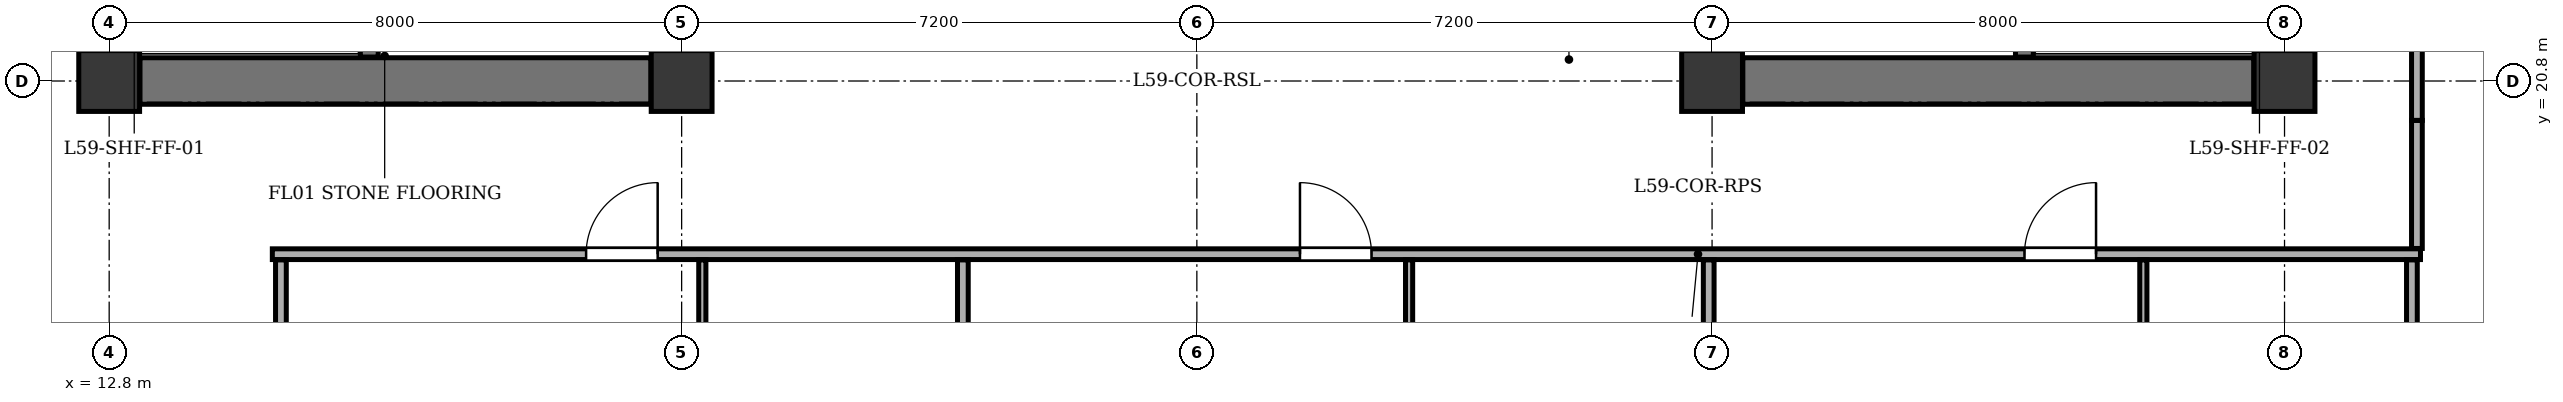
"""IFC4 building model, lengths in metres.
Left out: names, types, materials, properties, quantities, classifications, styles, units other than length and angle.
Written with IfcOpenShell. Run it as: python <this file> out.ifc"""

import sys

from ifc_helpers import new_model, si_unit, direction, frame, frame_2d, origin, origin_2d, place, context, subcontext, project, spatial, rectangle, extrude, element, fill, save


model = new_model("IFC4")
c1 = context("Model", 3, precision=1e-05, world=origin(), true_north=direction((0.0, 1.0)))
c2 = subcontext(c1, "Body", "Model", "MODEL_VIEW")
j1 = project(units=[si_unit("LENGTHUNIT", "METRE"), si_unit("PLANEANGLEUNIT", "RADIAN")], contexts=[c1])
p1 = place(None, origin())
s1 = spatial("IfcSite", under=j1, at=p1, CompositionType="ELEMENT")
p2 = place(p1, origin())
s2 = spatial("IfcBuilding", under=s1, at=p2, CompositionType="ELEMENT")
p3 = place(p2, frame((0.0, 0.0, 227.9)))
s3 = spatial("IfcBuildingStorey", under=s2, at=p3, CompositionType="ELEMENT", Elevation=227.9)
for number, where, z_axis, x_axis in (
    (1, (12.8, 20.8, 0.0), (0.0, 0.0, 1.0), (1.0, 0.0, 0.0)),
    (2, (20.8, 20.8, 0.0), (0.0, 0.0, 1.0), (1.0, 0.0, 0.0)),
    (3, (35.2, 20.8, 0.0), (0.0, 0.0, 1.0), (1.0, 0.0, 0.0)),
    (4, (43.2, 20.8, 0.0), (0.0, 0.0, 1.0), (1.0, 0.0, 0.0)),
):
    element("IfcColumn", number, at=place(p3, frame(where, z_axis=z_axis, x_axis=x_axis)), inside=s3, PredefinedType="COLUMN", context=c2, shape_type="SweptSolid", body=[
        extrude(rectangle(XDim=0.85, YDim=0.85, at=origin_2d()), origin(), (0.0, 0.0, 1.0), 3.4),
    ])
p4 = place(p3, frame((13.23, 20.8, 0.0), z_axis=(0.0, 0.0, 1.0), x_axis=(1.0, 0.0, 0.0)))
e5 = element("IfcWall", 5, at=p4, inside=s3, PredefinedType="SHEAR", context=c2, shape_type="SweptSolid", body=[
    extrude(rectangle(XDim=7.14, YDim=0.65, at=frame_2d((3.57, 0.0))), origin(), (0.0, 0.0, 1.0), 3.1),
])
p5 = place(p3, frame((16.435, 21.135, 0.0), z_axis=(0.0, 0.0, 1.0), x_axis=(0.0, 1.0, 0.0)))
e6 = element("IfcWall", 6, at=p5, inside=s3, PredefinedType="SHEAR", context=c2, shape_type="SweptSolid", body=[
    extrude(rectangle(XDim=12.13, YDim=0.25, at=frame_2d((6.065, 0.0))), origin(), (0.0, 0.0, 1.0), 3.1),
])
p6 = place(p5, frame((0.515, 0.0, 0.0)))
e7 = element("IfcOpeningElement", 7, at=p6, cuts=e6, PredefinedType="OPENING", context=c2, shape_type="SweptSolid", body=[
    extrude(rectangle(XDim=1.2, YDim=2.15, at=frame_2d((0.6, 1.075))), frame((0.0, 0.135, 0.0), z_axis=(0.0, -1.0, 0.0), x_axis=(1.0, 0.0, 0.0)), (0.0, 0.0, 1.0), 0.27),
])
p7 = place(p5, frame((2.665, 0.0, 0.0)))
e8 = element("IfcOpeningElement", 8, at=p7, cuts=e6, PredefinedType="OPENING", context=c2, shape_type="SweptSolid", body=[
    extrude(rectangle(XDim=1.15, YDim=2.15, at=frame_2d((0.575, 1.075))), frame((0.0, 0.135, 0.0), z_axis=(0.0, -1.0, 0.0), x_axis=(1.0, 0.0, 0.0)), (0.0, 0.0, 1.0), 0.27),
])
p8 = place(p3, frame((35.63, 20.8, 0.0), z_axis=(0.0, 0.0, 1.0), x_axis=(1.0, 0.0, 0.0)))
e9 = element("IfcWall", 9, at=p8, inside=s3, PredefinedType="SHEAR", context=c2, shape_type="SweptSolid", body=[
    extrude(rectangle(XDim=7.14, YDim=0.65, at=frame_2d((3.57, 0.0))), origin(), (0.0, 0.0, 1.0), 3.1),
])
p9 = place(p3, frame((39.565, 21.135, 0.0), z_axis=(0.0, 0.0, 1.0), x_axis=(0.0, 1.0, 0.0)))
e10 = element("IfcWall", 10, at=p9, inside=s3, PredefinedType="SHEAR", context=c2, shape_type="SweptSolid", body=[
    extrude(rectangle(XDim=12.13, YDim=0.25, at=frame_2d((6.065, 0.0))), origin(), (0.0, 0.0, 1.0), 3.1),
])
p10 = place(p9, frame((0.515, 0.0, 0.0)))
e11 = element("IfcOpeningElement", 11, at=p10, cuts=e10, PredefinedType="OPENING", context=c2, shape_type="SweptSolid", body=[
    extrude(rectangle(XDim=1.2, YDim=2.15, at=frame_2d((0.6, 1.075))), frame((0.0, 0.135, 0.0), z_axis=(0.0, -1.0, 0.0), x_axis=(1.0, 0.0, 0.0)), (0.0, 0.0, 1.0), 0.27),
])
p11 = place(p9, frame((2.665, 0.0, 0.0)))
e12 = element("IfcOpeningElement", 12, at=p11, cuts=e10, PredefinedType="OPENING", context=c2, shape_type="SweptSolid", body=[
    extrude(rectangle(XDim=1.15, YDim=2.15, at=frame_2d((0.575, 1.075))), frame((0.0, 0.135, 0.0), z_axis=(0.0, -1.0, 0.0), x_axis=(1.0, 0.0, 0.0)), (0.0, 0.0, 1.0), 0.27),
])
p12 = place(p3, frame((15.08, 18.38, 0.0), z_axis=(0.0, 0.0, 1.0), x_axis=(1.0, 0.0, 0.0)))
e13 = element("IfcWall", 13, at=p12, inside=s3, PredefinedType="PARTITIONING", context=c2, shape_type="SweptSolid", body=[
    extrude(rectangle(XDim=30.02, YDim=0.15, at=frame_2d((15.01, 0.0))), origin(), (0.0, 0.0, 1.0), 3.1),
])
p13 = place(p12, frame((4.385, 0.0, 0.0)))
e14 = element("IfcOpeningElement", 14, at=p13, cuts=e13, PredefinedType="OPENING", context=c2, shape_type="SweptSolid", body=[
    extrude(rectangle(XDim=1.0, YDim=2.1, at=frame_2d((0.5, 1.05))), frame((0.0, 0.085, 0.0), z_axis=(0.0, -1.0, 0.0), x_axis=(1.0, 0.0, 0.0)), (0.0, 0.0, 1.0), 0.17),
])
p14 = place(p12, frame((14.361, 0.0, 0.0)))
e15 = element("IfcOpeningElement", 15, at=p14, cuts=e13, PredefinedType="OPENING", context=c2, shape_type="SweptSolid", body=[
    extrude(rectangle(XDim=1.0, YDim=2.1, at=frame_2d((0.5, 1.05))), frame((0.0, 0.085, 0.0), z_axis=(0.0, -1.0, 0.0), x_axis=(1.0, 0.0, 0.0)), (0.0, 0.0, 1.0), 0.17),
])
p15 = place(p12, frame((24.486, 0.0, 0.0)))
e16 = element("IfcOpeningElement", 16, at=p15, cuts=e13, PredefinedType="OPENING", context=c2, shape_type="SweptSolid", body=[
    extrude(rectangle(XDim=1.0, YDim=2.1, at=frame_2d((0.5, 1.05))), frame((0.0, 0.085, 0.0), z_axis=(0.0, -1.0, 0.0), x_axis=(1.0, 0.0, 0.0)), (0.0, 0.0, 1.0), 0.17),
])
p16 = place(p3, frame((15.2, 3.045, 0.0), z_axis=(0.0, 0.0, 1.0), x_axis=(0.0, 1.0, 0.0)))
e17 = element("IfcWall", 17, at=p16, inside=s3, PredefinedType="PARTITIONING", context=c2, shape_type="SweptSolid", body=[
    extrude(rectangle(XDim=15.255, YDim=0.15, at=frame_2d((7.627, 0.0))), origin(), (0.0, 0.0, 1.0), 3.1),
])
p17 = place(p3, frame((21.089, 5.605, 0.0), z_axis=(0.0, 0.0, 1.0), x_axis=(0.0, 1.0, 0.0)))
e18 = element("IfcWall", 18, at=p17, inside=s3, PredefinedType="PARTITIONING", context=c2, shape_type="SweptSolid", body=[
    extrude(rectangle(XDim=12.695, YDim=0.1, at=frame_2d((6.348, 0.0))), origin(), (0.0, 0.0, 1.0), 2.535),
])
p18 = place(p17, frame((0.605, 0.0, 0.0)))
e19 = element("IfcOpeningElement", 19, at=p18, cuts=e18, PredefinedType="OPENING", context=c2, shape_type="SweptSolid", body=[
    extrude(rectangle(XDim=0.9, YDim=2.05, at=frame_2d((0.45, 1.025))), frame((0.0, 0.06, 0.0), z_axis=(0.0, -1.0, 0.0), x_axis=(1.0, 0.0, 0.0)), (0.0, 0.0, 1.0), 0.12),
])
p19 = place(p3, frame((24.73, 3.045, 0.0), z_axis=(0.0, 0.0, 1.0), x_axis=(0.0, 1.0, 0.0)))
e20 = element("IfcWall", 20, at=p19, inside=s3, PredefinedType="PARTITIONING", context=c2, shape_type="SweptSolid", body=[
    extrude(rectangle(XDim=15.255, YDim=0.15, at=frame_2d((7.627, 0.0))), origin(), (0.0, 0.0, 1.0), 3.1),
])
p20 = place(p3, frame((30.966, 5.605, 0.0), z_axis=(0.0, 0.0, 1.0), x_axis=(0.0, 1.0, 0.0)))
e21 = element("IfcWall", 21, at=p20, inside=s3, PredefinedType="PARTITIONING", context=c2, shape_type="SweptSolid", body=[
    extrude(rectangle(XDim=12.695, YDim=0.1, at=frame_2d((6.348, 0.0))), origin(), (0.0, 0.0, 1.0), 3.1),
])
p21 = place(p20, frame((0.605, 0.0, 0.0)))
e22 = element("IfcOpeningElement", 22, at=p21, cuts=e21, PredefinedType="OPENING", context=c2, shape_type="SweptSolid", body=[
    extrude(rectangle(XDim=0.9, YDim=2.05, at=frame_2d((0.45, 1.025))), frame((0.0, 0.06, 0.0), z_axis=(0.0, -1.0, 0.0), x_axis=(1.0, 0.0, 0.0)), (0.0, 0.0, 1.0), 0.12),
])
p22 = place(p3, frame((35.153, 3.045, 0.0), z_axis=(0.0, 0.0, 1.0), x_axis=(0.0, 1.0, 0.0)))
e23 = element("IfcWall", 23, at=p22, inside=s3, PredefinedType="PARTITIONING", context=c2, shape_type="SweptSolid", body=[
    extrude(rectangle(XDim=15.255, YDim=0.15, at=frame_2d((7.627, 0.0))), origin(), (0.0, 0.0, 1.0), 2.535),
])
p23 = place(p3, frame((41.227, 5.605, 0.0), z_axis=(0.0, 0.0, 1.0), x_axis=(0.0, 1.0, 0.0)))
e24 = element("IfcWall", 24, at=p23, inside=s3, PredefinedType="PARTITIONING", context=c2, shape_type="SweptSolid", body=[
    extrude(rectangle(XDim=12.695, YDim=0.1, at=frame_2d((6.348, 0.0))), origin(), (0.0, 0.0, 1.0), 3.1),
])
p24 = place(p23, frame((0.605, 0.0, 0.0)))
e25 = element("IfcOpeningElement", 25, at=p24, cuts=e24, PredefinedType="OPENING", context=c2, shape_type="SweptSolid", body=[
    extrude(rectangle(XDim=0.9, YDim=2.05, at=frame_2d((0.45, 1.025))), frame((0.0, 0.06, 0.0), z_axis=(0.0, -1.0, 0.0), x_axis=(1.0, 0.0, 0.0)), (0.0, 0.0, 1.0), 0.12),
])
p25 = place(p3, frame((44.98, 3.045, 0.0), z_axis=(0.0, 0.0, 1.0), x_axis=(0.0, 1.0, 0.0)))
e26 = element("IfcWall", 26, at=p25, inside=s3, PredefinedType="PARTITIONING", context=c2, shape_type="SweptSolid", body=[
    extrude(rectangle(XDim=15.255, YDim=0.15, at=frame_2d((7.627, 0.0))), origin(), (0.0, 0.0, 1.0), 2.725),
])
p26 = place(p3, frame((45.05, 18.46, 0.0), z_axis=(0.0, 0.0, 1.0), x_axis=(0.0, 1.0, 0.0)))
e27 = element("IfcWall", 27, at=p26, inside=s3, PredefinedType="PARTITIONING", context=c2, shape_type="SweptSolid", body=[
    extrude(rectangle(XDim=1.79, YDim=0.15, at=frame_2d((0.895, 0.0))), origin(), (0.0, 0.0, 1.0), 2.725),
])
p27 = place(p3, frame((45.05, 20.25, 0.0), z_axis=(0.0, 0.0, 1.0), x_axis=(0.0, 1.0, 0.0)))
e28 = element("IfcWall", 28, at=p27, inside=s3, PredefinedType="PARTITIONING", context=c2, shape_type="SweptSolid", body=[
    extrude(rectangle(XDim=13.9, YDim=0.15, at=frame_2d((6.95, 0.0))), origin(), (0.0, 0.0, 1.0), 2.725),
])
p28 = place(p13, origin())
e29 = element("IfcDoor", 29, at=p28, inside=s3, OperationType="SINGLE_SWING_RIGHT", PredefinedType="DOOR", context=c2, shape_type="SweptSolid", body=[
    extrude(rectangle(XDim=1.0, YDim=2.1, at=frame_2d((0.5, 1.05))), frame((0.0, 0.025, 0.0), z_axis=(0.0, -1.0, 0.0), x_axis=(1.0, 0.0, 0.0)), (0.0, 0.0, 1.0), 0.05),
])
fill(e14, e29)
p29 = place(p14, origin())
e30 = element("IfcDoor", 30, at=p29, inside=s3, OperationType="SINGLE_SWING_LEFT", PredefinedType="DOOR", context=c2, shape_type="SweptSolid", body=[
    extrude(rectangle(XDim=1.0, YDim=2.1, at=frame_2d((0.5, 1.05))), frame((0.0, 0.025, 0.0), z_axis=(0.0, -1.0, 0.0), x_axis=(1.0, 0.0, 0.0)), (0.0, 0.0, 1.0), 0.05),
])
fill(e15, e30)
p30 = place(p15, origin())
e31 = element("IfcDoor", 31, at=p30, inside=s3, OperationType="SINGLE_SWING_RIGHT", PredefinedType="DOOR", context=c2, shape_type="SweptSolid", body=[
    extrude(rectangle(XDim=1.0, YDim=2.1, at=frame_2d((0.5, 1.05))), frame((0.0, 0.025, 0.0), z_axis=(0.0, -1.0, 0.0), x_axis=(1.0, 0.0, 0.0)), (0.0, 0.0, 1.0), 0.05),
])
fill(e16, e31)
save(model, sys.argv[1])
